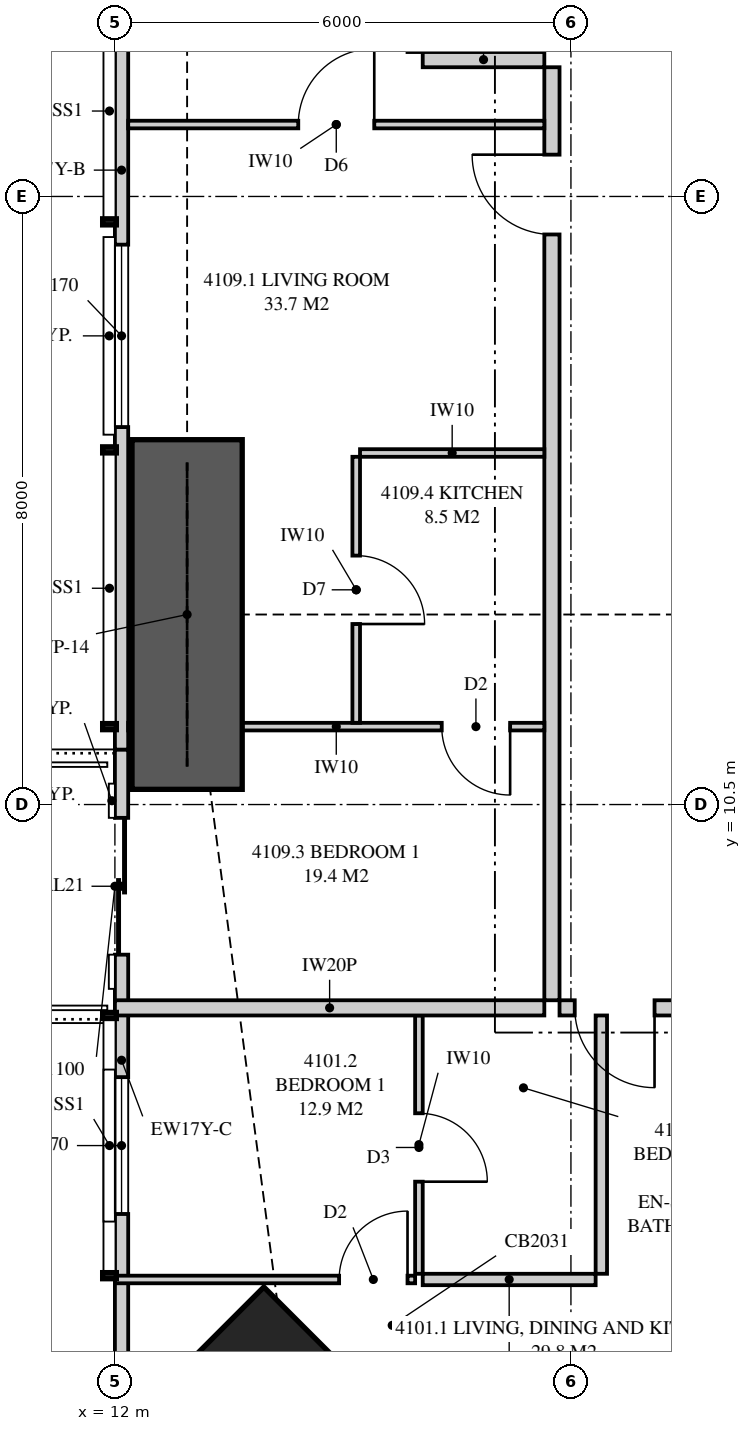
"""IFC4 building model, lengths in metres.
Left out: names, types, materials, properties, quantities, classifications, styles, units other than length and angle.
Written with IfcOpenShell. Run it as: python <this file> out.ifc"""

import sys

from ifc_helpers import new_model, si_unit, direction, frame, frame_2d, origin, origin_2d, place, context, subcontext, project, spatial, polyline, rectangle, hollow_rectangle, outline, extrude, element, fill, save


model = new_model("IFC4")
c1 = context("Model", 3, precision=1e-05, world=origin(), true_north=direction((0.0, 1.0)))
c2 = subcontext(c1, "Body", "Model", "MODEL_VIEW")
j1 = project(units=[si_unit("LENGTHUNIT", "METRE"), si_unit("PLANEANGLEUNIT", "RADIAN")], contexts=[c1])
p1 = place(None, origin())
s1 = spatial("IfcSite", under=j1, at=p1, CompositionType="ELEMENT")
p2 = place(p1, origin())
s2 = spatial("IfcBuilding", under=s1, at=p2, CompositionType="ELEMENT")
p3 = place(p2, frame((0.0, 0.0, 154.35)))
s3 = spatial("IfcBuildingStorey", under=s2, at=p3, CompositionType="ELEMENT", Elevation=154.35)
p4 = place(p3, frame((14.348, 2.348, 0.0), z_axis=(0.0, 0.0, 1.0), x_axis=(0.707106781187, 0.707106781187, 0.0)))
e1 = element("IfcColumn", 1, at=p4, inside=s3, PredefinedType="COLUMN", context=c2, shape_type="SweptSolid", body=[
    extrude(hollow_rectangle(XDim=2.0, YDim=3.1, WallThickness=0.125, at=origin_2d()), origin(), (0.0, 0.0, 1.0), 3.35),
])
p5 = place(p3, frame((12.087, 26.472, 0.0), z_axis=(0.0, 0.0, 1.0), x_axis=(0.0, -1.0, 0.0)))
e2 = element("IfcWall", 2, at=p5, inside=s3, PredefinedType="SOLIDWALL", context=c2, shape_type="SweptSolid", body=[
    extrude(outline(polyline([(15.251, 2.15), (0.0, 2.15), (0.0, 0.0), (0.762, 0.0), (0.762, 0.079), (2.182, 0.079), (2.182, 0.0), (12.762, 0.0), (12.762, 0.079), (14.182, 0.079), (14.182, 0.0), (15.251, 0.0), (15.251, 2.15)])), frame((0.0, 0.087, 0.0), z_axis=(0.0, -1.0, 0.0), x_axis=(1.0, 0.0, 0.0)), (0.0, 0.0, 1.0), 0.175),
])
p6 = place(p5, frame((3.89, 0.0, 0.4)))
e3 = element("IfcOpeningElement", 3, at=p6, cuts=e2, PredefinedType="OPENING", context=c2, shape_type="SweptSolid", body=[
    extrude(rectangle(XDim=1.2, YDim=1.7, at=frame_2d((0.6, 0.85))), frame((0.0, 0.097, 0.0), z_axis=(0.0, -1.0, 0.0), x_axis=(1.0, 0.0, 0.0)), (0.0, 0.0, 1.0), 0.195),
])
p7 = place(p5, frame((8.606, 0.0, 0.4)))
e4 = element("IfcOpeningElement", 4, at=p7, cuts=e2, PredefinedType="OPENING", context=c2, shape_type="SweptSolid", body=[
    extrude(rectangle(XDim=2.4, YDim=1.7, at=frame_2d((1.2, 0.85))), frame((0.0, 0.097, 0.0), z_axis=(0.0, -1.0, 0.0), x_axis=(1.0, 0.0, 0.0)), (0.0, 0.0, 1.0), 0.195),
])
p8 = place(p3, frame((12.087, 11.221, 0.0), z_axis=(0.0, 0.0, 1.0), x_axis=(0.0, -1.0, 0.0)))
e5 = element("IfcWall", 5, at=p8, inside=s3, PredefinedType="SOLIDWALL", context=c2, shape_type="SweptSolid", body=[
    extrude(rectangle(XDim=8.17, YDim=0.175, at=frame_2d((4.085, 0.0))), origin(), (0.0, 0.0, 1.0), 3.11),
])
p9 = place(p8, frame((0.896, 0.0, 0.0)))
e6 = element("IfcOpeningElement", 6, at=p9, cuts=e5, PredefinedType="OPENING", context=c2, shape_type="SweptSolid", body=[
    extrude(rectangle(XDim=1.8, YDim=2.1, at=frame_2d((0.9, 1.05))), frame((0.0, 0.097, 0.0), z_axis=(0.0, -1.0, 0.0), x_axis=(1.0, 0.0, 0.0)), (0.0, 0.0, 1.0), 0.195),
])
p10 = place(p8, frame((4.308, 0.0, 0.4)))
e7 = element("IfcOpeningElement", 7, at=p10, cuts=e5, PredefinedType="OPENING", context=c2, shape_type="SweptSolid", body=[
    extrude(rectangle(XDim=1.8, YDim=1.7, at=frame_2d((0.9, 0.85))), frame((0.0, 0.097, 0.0), z_axis=(0.0, -1.0, 0.0), x_axis=(1.0, 0.0, 0.0)), (0.0, 0.0, 1.0), 0.195),
])
p11 = place(p3, frame((17.85, 7.825, 0.0), z_axis=(0.0, 0.0, 1.0), x_axis=(1.0, 0.0, 0.0)))
e8 = element("IfcWall", 8, at=p11, inside=s3, PredefinedType="PARTITIONING", context=c2, shape_type="SweptSolid", body=[
    extrude(rectangle(XDim=2.85, YDim=0.2, at=frame_2d((1.425, 0.0))), origin(), (0.0, 0.0, 1.0), 3.11),
])
p12 = place(p11, frame((0.2, 0.0, 0.0)))
e9 = element("IfcOpeningElement", 9, at=p12, cuts=e8, PredefinedType="OPENING", context=c2, shape_type="SweptSolid", body=[
    extrude(rectangle(XDim=1.05, YDim=2.2, at=frame_2d((0.525, 1.1))), frame((0.0, 0.11, 0.0), z_axis=(0.0, -1.0, 0.0), x_axis=(1.0, 0.0, 0.0)), (0.0, 0.0, 1.0), 0.22),
])
p13 = place(p3, frame((16.0, 4.327, 0.0), z_axis=(0.0, 0.0, 1.0), x_axis=(0.0, 1.0, 0.0)))
e10 = element("IfcWall", 10, at=p13, inside=s3, PredefinedType="PARTITIONING", context=c2, shape_type="SweptSolid", body=[
    extrude(rectangle(XDim=3.398, YDim=0.1, at=frame_2d((1.699, 0.0))), origin(), (0.0, 0.0, 1.0), 3.11),
])
p14 = place(p13, frame((1.212, 0.0, 0.0)))
e11 = element("IfcOpeningElement", 11, at=p14, cuts=e10, PredefinedType="OPENING", context=c2, shape_type="SweptSolid", body=[
    extrude(rectangle(XDim=0.9, YDim=2.1, at=frame_2d((0.45, 1.05))), frame((0.0, 0.06, 0.0), z_axis=(0.0, -1.0, 0.0), x_axis=(1.0, 0.0, 0.0)), (0.0, 0.0, 1.0), 0.12),
])
p15 = place(p3, frame((15.95, 4.252, 0.0), z_axis=(0.0, 0.0, 1.0), x_axis=(-1.0, 0.0, 0.0)))
e12 = element("IfcWall", 12, at=p15, inside=s3, PredefinedType="PARTITIONING", context=c2, shape_type="SweptSolid", body=[
    extrude(outline(polyline([(0.0, 0.0), (3.95, 0.0), (3.95, 3.11), (2.92, 3.11), (2.92, 2.15), (0.782, 2.15), (0.782, 3.11), (0.0, 3.11), (0.0, 0.0)])), frame((0.0, 0.05, 0.0), z_axis=(0.0, -1.0, 0.0), x_axis=(1.0, 0.0, 0.0)), (0.0, 0.0, 1.0), 0.1),
])
p16 = place(p15, frame((0.1, 0.0, 0.0)))
e13 = element("IfcOpeningElement", 13, at=p16, cuts=e12, PredefinedType="OPENING", context=c2, shape_type="SweptSolid", body=[
    extrude(rectangle(XDim=0.9, YDim=2.1, at=frame_2d((0.45, 1.05))), frame((0.0, 0.06, 0.0), z_axis=(0.0, -1.0, 0.0), x_axis=(1.0, 0.0, 0.0)), (0.0, 0.0, 1.0), 0.12),
])
p17 = place(p3, frame((18.325, 4.252, 0.0), z_axis=(0.0, 0.0, 1.0), x_axis=(-1.0, 0.0, 0.0)))
e14 = element("IfcWall", 14, at=p17, inside=s3, PredefinedType="PLUMBINGWALL", context=c2, shape_type="SweptSolid", body=[
    extrude(rectangle(XDim=2.275, YDim=0.15, at=frame_2d((1.137, 0.0))), origin(), (0.0, 0.0, 1.0), 3.11),
])
p18 = place(p3, frame((18.4, 4.327, 0.0), z_axis=(0.0, 0.0, 1.0), x_axis=(0.0, 1.0, 0.0)))
e15 = element("IfcWall", 15, at=p18, inside=s3, PredefinedType="PLUMBINGWALL", context=c2, shape_type="SweptSolid", body=[
    extrude(rectangle(XDim=3.398, YDim=0.15, at=frame_2d((1.699, 0.0))), origin(), (0.0, 0.0, 1.0), 3.11),
])
p19 = place(p3, frame((12.0, 7.825, 0.0), z_axis=(0.0, 0.0, 1.0), x_axis=(1.0, 0.0, 0.0)))
e16 = element("IfcWall", 16, at=p19, inside=s3, PredefinedType="PARTITIONING", context=c2, shape_type="SweptSolid", body=[
    extrude(outline(polyline([(0.0, 0.0), (5.65, 0.0), (5.65, 3.11), (2.749, 3.11), (2.749, 2.15), (0.51, 2.15), (0.51, 3.11), (0.0, 3.11), (0.0, 0.0)])), frame((0.0, 0.1, 0.0), z_axis=(0.0, -1.0, 0.0), x_axis=(1.0, 0.0, 0.0)), (0.0, 0.0, 1.0), 0.2),
])
p20 = place(p3, frame((17.75, 7.925, 0.0), z_axis=(0.0, 0.0, 1.0), x_axis=(0.0, 1.0, 0.0)))
e17 = element("IfcWall", 17, at=p20, inside=s3, PredefinedType="PARTITIONING", context=c2, shape_type="SweptSolid", body=[
    extrude(outline(polyline([(0.0, 0.0), (12.275, 0.0), (12.275, 3.11), (5.421, 3.11), (5.421, 2.531), (4.729, 2.531), (4.729, 3.11), (0.0, 3.11), (0.0, 0.0)])), frame((0.0, 0.1, 0.0), z_axis=(0.0, -1.0, 0.0), x_axis=(1.0, 0.0, 0.0)), (0.0, 0.0, 1.0), 0.2),
])
p21 = place(p20, frame((10.075, 0.0, 0.0)))
e18 = element("IfcOpeningElement", 18, at=p21, cuts=e17, PredefinedType="OPENING", context=c2, shape_type="SweptSolid", body=[
    extrude(rectangle(XDim=1.05, YDim=2.2, at=frame_2d((0.525, 1.1))), frame((0.0, 0.11, 0.0), z_axis=(0.0, -1.0, 0.0), x_axis=(1.0, 0.0, 0.0)), (0.0, 0.0, 1.0), 0.22),
])
p22 = place(p3, frame((12.175, 11.525, 0.0), z_axis=(0.0, 0.0, 1.0), x_axis=(1.0, 0.0, 0.0)))
e19 = element("IfcWall", 19, at=p22, inside=s3, PredefinedType="PARTITIONING", context=c2, shape_type="SweptSolid", body=[
    extrude(outline(polyline([(0.529, 2.15), (0.0, 2.15), (0.0, 0.0), (0.529, 0.0), (0.529, 0.148), (1.021, 0.148), (1.021, 0.0), (5.475, 0.0), (5.475, 3.11), (2.038, 3.11), (2.038, 2.15), (1.021, 2.15), (1.021, 1.852), (0.529, 1.852), (0.529, 2.15)])), frame((0.0, 0.05, 0.0), z_axis=(0.0, -1.0, 0.0), x_axis=(1.0, 0.0, 0.0)), (0.0, 0.0, 1.0), 0.1),
])
p23 = place(p22, frame((4.125, 0.0, 0.0)))
e20 = element("IfcOpeningElement", 20, at=p23, cuts=e19, PredefinedType="OPENING", context=c2, shape_type="SweptSolid", body=[
    extrude(rectangle(XDim=0.9, YDim=2.1, at=frame_2d((0.45, 1.05))), frame((0.0, 0.06, 0.0), z_axis=(0.0, -1.0, 0.0), x_axis=(1.0, 0.0, 0.0)), (0.0, 0.0, 1.0), 0.12),
])
p24 = place(p3, frame((15.175, 11.575, 0.0), z_axis=(0.0, 0.0, 1.0), x_axis=(0.0, 1.0, 0.0)))
e21 = element("IfcWall", 21, at=p24, inside=s3, PredefinedType="PARTITIONING", context=c2, shape_type="SweptSolid", body=[
    extrude(outline(polyline([(0.0, 0.0), (3.5, 0.0), (3.5, 3.11), (1.721, 3.11), (1.721, 2.531), (1.129, 2.531), (1.129, 3.11), (0.0, 3.11), (0.0, 0.0)])), frame((0.0, 0.05, 0.0), z_axis=(0.0, -1.0, 0.0), x_axis=(1.0, 0.0, 0.0)), (0.0, 0.0, 1.0), 0.1),
])
p25 = place(p24, frame((1.3, 0.0, 0.0)))
e22 = element("IfcOpeningElement", 22, at=p25, cuts=e21, PredefinedType="OPENING", context=c2, shape_type="SweptSolid", body=[
    extrude(rectangle(XDim=0.9, YDim=2.1, at=frame_2d((0.45, 1.05))), frame((0.0, 0.06, 0.0), z_axis=(0.0, -1.0, 0.0), x_axis=(1.0, 0.0, 0.0)), (0.0, 0.0, 1.0), 0.12),
])
p26 = place(p3, frame((15.225, 15.125, 0.0), z_axis=(0.0, 0.0, 1.0), x_axis=(1.0, 0.0, 0.0)))
e23 = element("IfcWall", 23, at=p26, inside=s3, PredefinedType="PARTITIONING", context=c2, shape_type="SweptSolid", body=[
    extrude(rectangle(XDim=2.425, YDim=0.1, at=frame_2d((1.212, 0.0))), origin(), (0.0, 0.0, 1.0), 3.11),
])
p27 = place(p3, frame((12.175, 19.446, 0.0), z_axis=(0.0, 0.0, 1.0), x_axis=(1.0, 0.0, 0.0)))
e24 = element("IfcWall", 24, at=p27, inside=s3, PredefinedType="PARTITIONING", context=c2, shape_type="SweptSolid", body=[
    extrude(outline(polyline([(0.0, 0.0), (5.475, 0.0), (5.475, 3.11), (1.835, 3.11), (1.835, 2.15), (0.0, 2.15), (0.0, 3.11), (0.0, 0.0)])), frame((0.0, 0.05, 0.0), z_axis=(0.0, -1.0, 0.0), x_axis=(1.0, 0.0, 0.0)), (0.0, 0.0, 1.0), 0.1),
])
p28 = place(p27, frame((2.238, 0.0, 0.0)))
e25 = element("IfcOpeningElement", 25, at=p28, cuts=e24, PredefinedType="OPENING", context=c2, shape_type="SweptSolid", body=[
    extrude(rectangle(XDim=1.0, YDim=2.1, at=frame_2d((0.5, 1.05))), frame((0.0, 0.06, 0.0), z_axis=(0.0, -1.0, 0.0), x_axis=(1.0, 0.0, 0.0)), (0.0, 0.0, 1.0), 0.12),
])
p29 = place(p3, frame((17.65, 20.3, 0.0), z_axis=(0.0, 0.0, 1.0), x_axis=(-1.0, 0.0, 0.0)))
e26 = element("IfcWall", 26, at=p29, inside=s3, PredefinedType="PARTITIONING", context=c2, shape_type="SweptSolid", body=[
    extrude(rectangle(XDim=1.6, YDim=0.2, at=frame_2d((0.8, 0.0))), origin(), (0.0, 0.0, 1.0), 3.11),
])
p30 = place(p3, frame((12.95, 10.7, 0.0), z_axis=(0.0, 0.0, 1.0), x_axis=(0.0, 1.0, 0.0)))
e27 = element("IfcWall", 27, at=p30, inside=s3, PredefinedType="SHEAR", context=c2, shape_type="SweptSolid", body=[
    extrude(rectangle(XDim=4.6, YDim=1.45, at=frame_2d((2.3, 0.0))), origin(), (0.0, 0.0, 1.0), 3.35),
])
p31 = place(p7, origin())
e28 = element("IfcWindow", 28, at=p31, inside=s3, PartitioningType="SINGLE_PANEL", PredefinedType="WINDOW", context=c2, shape_type="SweptSolid", body=[
    extrude(rectangle(XDim=2.4, YDim=1.7, at=frame_2d((1.2, 0.85))), frame((0.0, 0.03, 0.0), z_axis=(0.0, -1.0, 0.0), x_axis=(1.0, 0.0, 0.0)), (0.0, 0.0, 1.0), 0.06),
])
fill(e4, e28)
p32 = place(p9, origin())
e29 = element("IfcDoor", 29, at=p32, inside=s3, OperationType="SLIDING_TO_LEFT", PredefinedType="DOOR", context=c2, shape_type="SweptSolid", body=[
    extrude(rectangle(XDim=1.8, YDim=2.1, at=frame_2d((0.9, 1.05))), frame((0.0, 0.025, 0.0), z_axis=(0.0, -1.0, 0.0), x_axis=(1.0, 0.0, 0.0)), (0.0, 0.0, 1.0), 0.05),
])
fill(e6, e29)
p33 = place(p10, origin())
e30 = element("IfcWindow", 30, at=p33, inside=s3, PartitioningType="SINGLE_PANEL", PredefinedType="WINDOW", context=c2, shape_type="SweptSolid", body=[
    extrude(rectangle(XDim=1.8, YDim=1.7, at=frame_2d((0.9, 0.85))), frame((0.0, 0.03, 0.0), z_axis=(0.0, -1.0, 0.0), x_axis=(1.0, 0.0, 0.0)), (0.0, 0.0, 1.0), 0.06),
])
fill(e7, e30)
p34 = place(p12, frame((1.05, 0.0, 0.0), z_axis=(0.0, 0.0, 1.0), x_axis=(-1.0, 0.0, 0.0)))
e31 = element("IfcDoor", 31, at=p34, inside=s3, OperationType="SINGLE_SWING_LEFT", PredefinedType="DOOR", context=c2, shape_type="SweptSolid", body=[
    extrude(rectangle(XDim=1.05, YDim=2.2, at=frame_2d((0.525, 1.1))), frame((0.0, 0.025, 0.0), z_axis=(0.0, -1.0, 0.0), x_axis=(1.0, 0.0, 0.0)), (0.0, 0.0, 1.0), 0.05),
])
fill(e9, e31)
p35 = place(p16, frame((0.9, 0.0, 0.0), z_axis=(0.0, 0.0, 1.0), x_axis=(-1.0, 0.0, 0.0)))
e32 = element("IfcDoor", 32, at=p35, inside=s3, OperationType="SINGLE_SWING_RIGHT", PredefinedType="DOOR", context=c2, shape_type="SweptSolid", body=[
    extrude(rectangle(XDim=0.9, YDim=2.1, at=frame_2d((0.45, 1.05))), frame((0.0, 0.025, 0.0), z_axis=(0.0, -1.0, 0.0), x_axis=(1.0, 0.0, 0.0)), (0.0, 0.0, 1.0), 0.05),
])
fill(e13, e32)
p36 = place(p14, frame((0.9, 0.0, 0.0), z_axis=(0.0, 0.0, 1.0), x_axis=(-1.0, 0.0, 0.0)))
e33 = element("IfcDoor", 33, at=p36, inside=s3, OperationType="SINGLE_SWING_RIGHT", PredefinedType="DOOR", context=c2, shape_type="SweptSolid", body=[
    extrude(rectangle(XDim=0.9, YDim=2.1, at=frame_2d((0.45, 1.05))), frame((0.0, 0.025, 0.0), z_axis=(0.0, -1.0, 0.0), x_axis=(1.0, 0.0, 0.0)), (0.0, 0.0, 1.0), 0.05),
])
fill(e11, e33)
p37 = place(p21, origin())
e34 = element("IfcDoor", 34, at=p37, inside=s3, OperationType="SINGLE_SWING_RIGHT", PredefinedType="DOOR", context=c2, shape_type="SweptSolid", body=[
    extrude(rectangle(XDim=1.05, YDim=2.2, at=frame_2d((0.525, 1.1))), frame((0.0, 0.025, 0.0), z_axis=(0.0, -1.0, 0.0), x_axis=(1.0, 0.0, 0.0)), (0.0, 0.0, 1.0), 0.05),
])
fill(e18, e34)
p38 = place(p23, frame((0.9, 0.0, 0.0), z_axis=(0.0, 0.0, 1.0), x_axis=(-1.0, 0.0, 0.0)))
e35 = element("IfcDoor", 35, at=p38, inside=s3, OperationType="SINGLE_SWING_LEFT", PredefinedType="DOOR", context=c2, shape_type="SweptSolid", body=[
    extrude(rectangle(XDim=0.9, YDim=2.1, at=frame_2d((0.45, 1.05))), frame((0.0, 0.025, 0.0), z_axis=(0.0, -1.0, 0.0), x_axis=(1.0, 0.0, 0.0)), (0.0, 0.0, 1.0), 0.05),
])
fill(e20, e35)
p39 = place(p25, frame((0.9, 0.0, 0.0), z_axis=(0.0, 0.0, 1.0), x_axis=(-1.0, 0.0, 0.0)))
e36 = element("IfcDoor", 36, at=p39, inside=s3, OperationType="SINGLE_SWING_RIGHT", PredefinedType="DOOR", context=c2, shape_type="SweptSolid", body=[
    extrude(rectangle(XDim=0.9, YDim=2.1, at=frame_2d((0.45, 1.05))), frame((0.0, 0.025, 0.0), z_axis=(0.0, -1.0, 0.0), x_axis=(1.0, 0.0, 0.0)), (0.0, 0.0, 1.0), 0.05),
])
fill(e22, e36)
p40 = place(p28, origin())
e37 = element("IfcDoor", 37, at=p40, inside=s3, OperationType="SINGLE_SWING_RIGHT", PredefinedType="DOOR", context=c2, shape_type="SweptSolid", body=[
    extrude(rectangle(XDim=1.0, YDim=2.1, at=frame_2d((0.5, 1.05))), frame((0.0, 0.025, 0.0), z_axis=(0.0, -1.0, 0.0), x_axis=(1.0, 0.0, 0.0)), (0.0, 0.0, 1.0), 0.05),
])
fill(e25, e37)
save(model, sys.argv[1])
